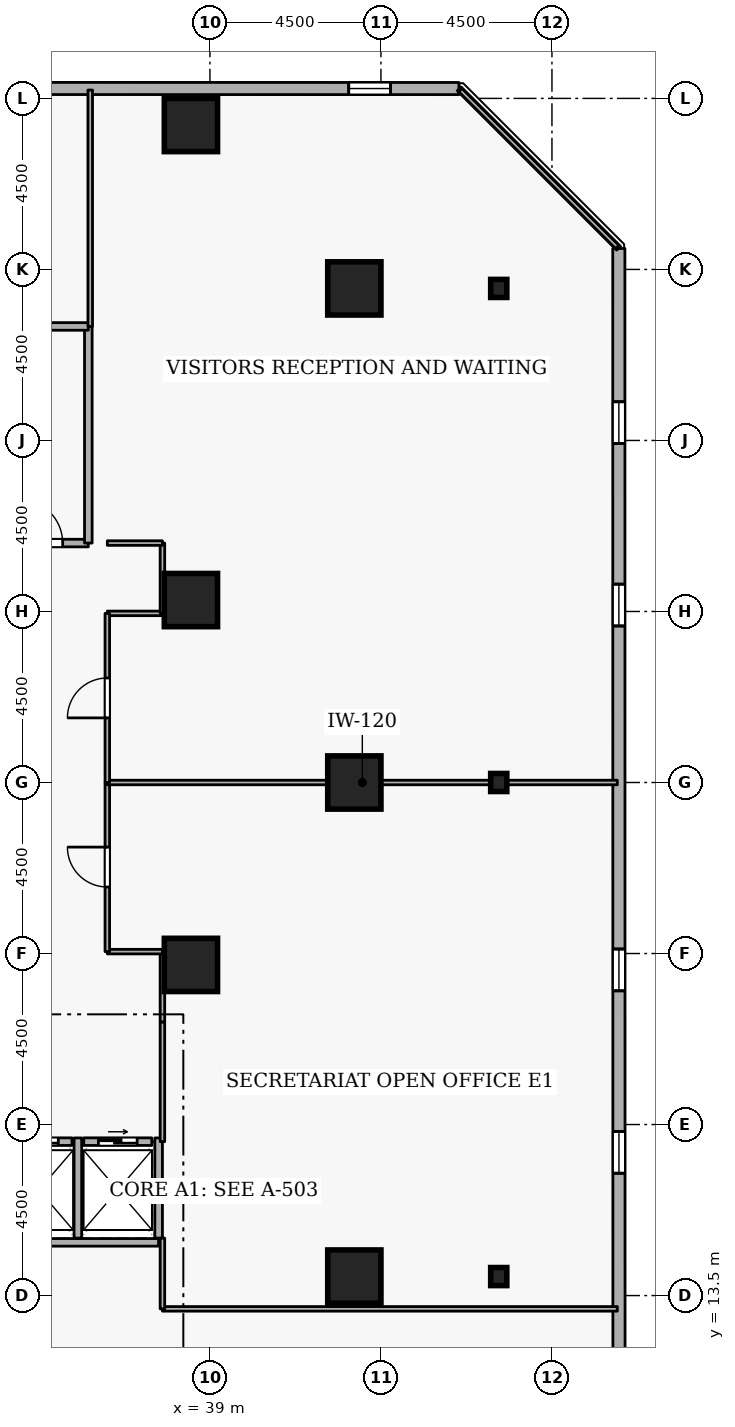
"""IFC4 building model, lengths in metres.
Left out: names, types, materials, properties, quantities, classifications, styles, units other than length and angle.
Written with IfcOpenShell. Run it as: python <this file> out.ifc"""

import sys

from ifc_helpers import new_model, si_unit, direction, frame, frame_2d, origin, origin_2d, place, context, subcontext, project, spatial, rectangle, i_section, extrude, element, fill, save


model = new_model("IFC4")
c1 = context("Model", 3, precision=1e-05, world=origin(), true_north=direction((0.0, 1.0)))
c2 = subcontext(c1, "Body", "Model", "MODEL_VIEW")
j1 = project(units=[si_unit("LENGTHUNIT", "METRE"), si_unit("PLANEANGLEUNIT", "RADIAN")], contexts=[c1])
p1 = place(None, origin())
s1 = spatial("IfcSite", under=j1, at=p1, CompositionType="ELEMENT")
p2 = place(p1, origin())
s2 = spatial("IfcBuilding", under=s1, at=p2, CompositionType="ELEMENT")
p3 = place(p2, frame((0.0, 0.0, 49.5)))
s3 = spatial("IfcBuildingStorey", under=s2, at=p3, CompositionType="ELEMENT", Elevation=49.5)
for number, where, z_axis, x_axis in (
    (1, (42.8, 14.0, 0.0), (0.0, 0.0, 1.0), (1.0, 0.0, 0.0)),
    (2, (42.8, 27.0, 0.0), (0.0, 0.0, 1.0), (1.0, 0.0, 0.0)),
    (3, (42.8, 40.0, 0.0), (0.0, 0.0, 1.0), (1.0, 0.0, 0.0)),
    (4, (38.5, 44.3, 0.0), (0.0, 0.0, 1.0), (1.0, 0.0, 0.0)),
    (5, (38.5, 22.2, 0.0), (0.0, 0.0, 1.0), (1.0, 0.0, 0.0)),
    (6, (38.5, 31.8, 0.0), (0.0, 0.0, 1.0), (1.0, 0.0, 0.0)),
):
    element("IfcColumn", number, at=place(p3, frame(where, z_axis=z_axis, x_axis=x_axis)), inside=s3, PredefinedType="COLUMN", context=c2, shape_type="SweptSolid", body=[
        extrude(rectangle(XDim=1.4, YDim=1.4, at=origin_2d()), origin(), (0.0, 0.0, 1.0), 4.2),
    ])
for number, where, z_axis, x_axis in (
    (7, (46.6, 14.0, 0.0), (0.0, 0.0, 1.0), (1.0, 0.0, 0.0)),
    (8, (46.6, 27.0, 0.0), (0.0, 0.0, 1.0), (1.0, 0.0, 0.0)),
    (9, (46.6, 40.0, 0.0), (0.0, 0.0, 1.0), (1.0, 0.0, 0.0)),
):
    element("IfcColumn", number, at=place(p3, frame(where, z_axis=z_axis, x_axis=x_axis)), inside=s3, PredefinedType="COLUMN", context=c2, shape_type="SweptSolid", body=[
        extrude(i_section(OverallWidth=0.424, OverallDepth=0.475, WebThickness=0.048, FlangeThickness=0.077, FilletRadius=0.015, at=origin_2d()), origin(), (0.0, 0.0, 1.0), 4.2),
    ])
p4 = place(p3, frame((49.765, 5.319, 0.0), z_axis=(0.0, 0.0, 1.0), x_axis=(-0.000150313265, 0.999999988703, 0.0)))
e10 = element("IfcWall", 10, at=p4, inside=s3, PredefinedType="STANDARD", context=c2, shape_type="SweptSolid", body=[
    extrude(rectangle(XDim=35.733, YDim=0.32, at=frame_2d((17.866, 0.0))), origin(), (0.0, 0.0, 1.0), 3.3),
])
p5 = place(p4, frame((1.8, 0.0, 0.72)))
e11 = element("IfcOpeningElement", 11, at=p5, cuts=e10, PredefinedType="OPENING", context=c2, shape_type="SweptSolid", body=[
    extrude(rectangle(XDim=1.1, YDim=1.8, at=frame_2d((0.55, 0.9))), frame((0.0, 0.17, 0.0), z_axis=(0.0, -1.0, 0.0), x_axis=(1.0, 0.0, 0.0)), (0.0, 0.0, 1.0), 0.34),
])
p6 = place(p4, frame((11.4, 0.0, 0.72)))
e12 = element("IfcOpeningElement", 12, at=p6, cuts=e10, PredefinedType="OPENING", context=c2, shape_type="SweptSolid", body=[
    extrude(rectangle(XDim=1.1, YDim=1.8, at=frame_2d((0.55, 0.9))), frame((0.0, 0.17, 0.0), z_axis=(0.0, -1.0, 0.0), x_axis=(1.0, 0.0, 0.0)), (0.0, 0.0, 1.0), 0.34),
])
p7 = place(p4, frame((16.2, 0.0, 0.72)))
e13 = element("IfcOpeningElement", 13, at=p7, cuts=e10, PredefinedType="OPENING", context=c2, shape_type="SweptSolid", body=[
    extrude(rectangle(XDim=1.1, YDim=1.8, at=frame_2d((0.55, 0.9))), frame((0.0, 0.17, 0.0), z_axis=(0.0, -1.0, 0.0), x_axis=(1.0, 0.0, 0.0)), (0.0, 0.0, 1.0), 0.34),
])
p8 = place(p4, frame((25.8, 0.0, 0.72)))
e14 = element("IfcOpeningElement", 14, at=p8, cuts=e10, PredefinedType="OPENING", context=c2, shape_type="SweptSolid", body=[
    extrude(rectangle(XDim=1.1, YDim=1.8, at=frame_2d((0.55, 0.9))), frame((0.0, 0.17, 0.0), z_axis=(0.0, -1.0, 0.0), x_axis=(1.0, 0.0, 0.0)), (0.0, 0.0, 1.0), 0.34),
])
p9 = place(p4, frame((30.6, 0.0, 0.72)))
e15 = element("IfcOpeningElement", 15, at=p9, cuts=e10, PredefinedType="OPENING", context=c2, shape_type="SweptSolid", body=[
    extrude(rectangle(XDim=1.1, YDim=1.8, at=frame_2d((0.55, 0.9))), frame((0.0, 0.17, 0.0), z_axis=(0.0, -1.0, 0.0), x_axis=(1.0, 0.0, 0.0)), (0.0, 0.0, 1.0), 0.34),
])
p10 = place(p3, frame((45.552, 45.26, 0.0), z_axis=(0.0, 0.0, 1.0), x_axis=(-0.999999988703, 0.000150313265, 0.0)))
e16 = element("IfcWall", 16, at=p10, inside=s3, PredefinedType="STANDARD", context=c2, shape_type="SweptSolid", body=[
    extrude(rectangle(XDim=35.733, YDim=0.32, at=frame_2d((17.866, 0.0))), origin(), (0.0, 0.0, 1.0), 3.3),
])
p11 = place(p10, frame((1.8, 0.0, 0.72)))
e17 = element("IfcOpeningElement", 17, at=p11, cuts=e16, PredefinedType="OPENING", context=c2, shape_type="SweptSolid", body=[
    extrude(rectangle(XDim=1.1, YDim=1.8, at=frame_2d((0.55, 0.9))), frame((0.0, 0.17, 0.0), z_axis=(0.0, -1.0, 0.0), x_axis=(1.0, 0.0, 0.0)), (0.0, 0.0, 1.0), 0.34),
])
p12 = place(p10, frame((11.4, 0.0, 0.72)))
e18 = element("IfcOpeningElement", 18, at=p12, cuts=e16, PredefinedType="OPENING", context=c2, shape_type="SweptSolid", body=[
    extrude(rectangle(XDim=1.1, YDim=1.8, at=frame_2d((0.55, 0.9))), frame((0.0, 0.17, 0.0), z_axis=(0.0, -1.0, 0.0), x_axis=(1.0, 0.0, 0.0)), (0.0, 0.0, 1.0), 0.34),
])
p13 = place(p10, frame((16.2, 0.0, 0.72)))
e19 = element("IfcOpeningElement", 19, at=p13, cuts=e16, PredefinedType="OPENING", context=c2, shape_type="SweptSolid", body=[
    extrude(rectangle(XDim=1.1, YDim=1.8, at=frame_2d((0.55, 0.9))), frame((0.0, 0.17, 0.0), z_axis=(0.0, -1.0, 0.0), x_axis=(1.0, 0.0, 0.0)), (0.0, 0.0, 1.0), 0.34),
])
p14 = place(p10, frame((25.8, 0.0, 0.72)))
e20 = element("IfcOpeningElement", 20, at=p14, cuts=e16, PredefinedType="OPENING", context=c2, shape_type="SweptSolid", body=[
    extrude(rectangle(XDim=1.1, YDim=1.8, at=frame_2d((0.55, 0.9))), frame((0.0, 0.17, 0.0), z_axis=(0.0, -1.0, 0.0), x_axis=(1.0, 0.0, 0.0)), (0.0, 0.0, 1.0), 0.34),
])
p15 = place(p10, frame((30.6, 0.0, 0.72)))
e21 = element("IfcOpeningElement", 21, at=p15, cuts=e16, PredefinedType="OPENING", context=c2, shape_type="SweptSolid", body=[
    extrude(rectangle(XDim=1.1, YDim=1.8, at=frame_2d((0.55, 0.9))), frame((0.0, 0.17, 0.0), z_axis=(0.0, -1.0, 0.0), x_axis=(1.0, 0.0, 0.0)), (0.0, 0.0, 1.0), 0.34),
])
p16 = place(p3, frame((33.63, 17.55, 0.0), z_axis=(0.0, 0.0, 1.0), x_axis=(1.0, 0.0, 0.0)))
e22 = element("IfcWall", 22, at=p16, inside=s3, PredefinedType="STANDARD", context=c2, shape_type="SweptSolid", body=[
    extrude(rectangle(XDim=1.74, YDim=0.2, at=frame_2d((0.87, 0.0))), origin(), (0.0, 0.0, 1.0), 3.94),
])
p17 = place(p16, frame((0.36, 0.0, 0.0)))
e23 = element("IfcOpeningElement", 23, at=p17, cuts=e22, PredefinedType="OPENING", context=c2, shape_type="SweptSolid", body=[
    extrude(rectangle(XDim=1.02, YDim=2.06, at=frame_2d((0.51, 1.03))), frame((0.0, 0.11, 0.0), z_axis=(0.0, -1.0, 0.0), x_axis=(1.0, 0.0, 0.0)), (0.0, 0.0, 1.0), 0.22),
])
p18 = place(p3, frame((35.68, 17.55, 0.0), z_axis=(0.0, 0.0, 1.0), x_axis=(1.0, 0.0, 0.0)))
e24 = element("IfcWall", 24, at=p18, inside=s3, PredefinedType="STANDARD", context=c2, shape_type="SweptSolid", body=[
    extrude(rectangle(XDim=1.79, YDim=0.2, at=frame_2d((0.895, 0.0))), origin(), (0.0, 0.0, 1.0), 3.94),
])
p19 = place(p18, frame((0.385, 0.0, 0.0)))
e25 = element("IfcOpeningElement", 25, at=p19, cuts=e24, PredefinedType="OPENING", context=c2, shape_type="SweptSolid", body=[
    extrude(rectangle(XDim=1.02, YDim=2.06, at=frame_2d((0.51, 1.03))), frame((0.0, 0.11, 0.0), z_axis=(0.0, -1.0, 0.0), x_axis=(1.0, 0.0, 0.0)), (0.0, 0.0, 1.0), 0.22),
])
p20 = place(p3, frame((33.452, 14.9, 0.0), z_axis=(0.0, 0.0, 1.0), x_axis=(1.0, 0.0, 0.0)))
e26 = element("IfcWall", 26, at=p20, inside=s3, PredefinedType="STANDARD", context=c2, shape_type="SweptSolid", body=[
    extrude(rectangle(XDim=4.196, YDim=0.2, at=frame_2d((2.098, 0.0))), origin(), (0.0, 0.0, 1.0), 3.94),
])
for number, where, z_axis, x_axis in (
    (27, (35.525, 15.012, 0.0), (0.0, 0.0, 1.0), (0.0, 1.0, 0.0)),
    (28, (37.65, 15.012, 0.0), (0.0, 0.0, 1.0), (0.0, 1.0, 0.0)),
):
    element("IfcWall", number, at=place(p3, frame(where, z_axis=z_axis, x_axis=x_axis)), inside=s3, PredefinedType="STANDARD", context=c2, shape_type="SweptSolid", body=[
        extrude(rectangle(XDim=2.636, YDim=0.2, at=frame_2d((1.318, 0.0))), origin(), (0.0, 0.0, 1.0), 3.94),
    ])
p21 = place(p3, frame((33.3, 33.3, 0.0), z_axis=(0.0, 0.0, 1.0), x_axis=(1.0, 0.0, 0.0)))
e29 = element("IfcWall", 29, at=p21, inside=s3, PredefinedType="STANDARD", context=c2, shape_type="SweptSolid", body=[
    extrude(rectangle(XDim=2.5, YDim=0.2, at=frame_2d((1.25, 0.0))), origin(), (0.0, 0.0, 1.0), 3.94),
])
p22 = place(p21, frame((0.675, 0.0, 0.0)))
e30 = element("IfcOpeningElement", 30, at=p22, cuts=e29, PredefinedType="OPENING", context=c2, shape_type="SweptSolid", body=[
    extrude(rectangle(XDim=1.15, YDim=2.1, at=frame_2d((0.575, 1.05))), frame((0.0, 0.11, 0.0), z_axis=(0.0, -1.0, 0.0), x_axis=(1.0, 0.0, 0.0)), (0.0, 0.0, 1.0), 0.22),
])
p23 = place(p3, frame((35.8, 33.3, 0.0), z_axis=(0.0, 0.0, 1.0), x_axis=(0.0, 1.0, 0.0)))
e31 = element("IfcWall", 31, at=p23, inside=s3, PredefinedType="STANDARD", context=c2, shape_type="SweptSolid", body=[
    extrude(rectangle(XDim=5.7, YDim=0.2, at=frame_2d((2.85, 0.0))), origin(), (0.0, 0.0, 1.0), 3.94),
])
p24 = place(p3, frame((35.8, 39.0, 0.0), z_axis=(0.0, 0.0, 1.0), x_axis=(-1.0, 0.0, 0.0)))
e32 = element("IfcWall", 32, at=p24, inside=s3, PredefinedType="STANDARD", context=c2, shape_type="SweptSolid", body=[
    extrude(rectangle(XDim=2.5, YDim=0.2, at=frame_2d((1.25, 0.0))), origin(), (0.0, 0.0, 1.0), 3.94),
])
p25 = place(p3, frame((37.75, 17.55, 0.0), z_axis=(0.0, 0.0, 1.0), x_axis=(0.0, 1.0, 0.0)))
e33 = element("IfcWall", 33, at=p25, inside=s3, PredefinedType="PARTITIONING", context=c2, shape_type="SweptSolid", body=[
    extrude(rectangle(XDim=3.15, YDim=0.12, at=frame_2d((1.575, 0.0))), origin(), (0.0, 0.0, 1.0), 3.94),
])
p26 = place(p3, frame((37.75, 20.7, 0.0), z_axis=(0.0, 0.0, 1.0), x_axis=(0.0, 1.0, 0.0)))
e34 = element("IfcWall", 34, at=p26, inside=s3, PredefinedType="PARTITIONING", context=c2, shape_type="SweptSolid", body=[
    extrude(rectangle(XDim=1.85, YDim=0.12, at=frame_2d((0.925, 0.0))), origin(), (0.0, 0.0, 1.0), 3.94),
])
p27 = place(p3, frame((37.75, 22.55, 0.0), z_axis=(0.0, 0.0, 1.0), x_axis=(-1.0, 0.0, 0.0)))
e35 = element("IfcWall", 35, at=p27, inside=s3, PredefinedType="PARTITIONING", context=c2, shape_type="SweptSolid", body=[
    extrude(rectangle(XDim=1.45, YDim=0.12, at=frame_2d((0.725, 0.0))), origin(), (0.0, 0.0, 1.0), 3.94),
])
p28 = place(p3, frame((36.3, 22.55, 0.0), z_axis=(0.0, 0.0, 1.0), x_axis=(0.0, 1.0, 0.0)))
e36 = element("IfcWall", 36, at=p28, inside=s3, PredefinedType="PARTITIONING", context=c2, shape_type="SweptSolid", body=[
    extrude(rectangle(XDim=4.45, YDim=0.12, at=frame_2d((2.225, 0.0))), origin(), (0.0, 0.0, 1.0), 3.94),
])
p29 = place(p28, frame((1.7, 0.0, 0.0)))
e37 = element("IfcOpeningElement", 37, at=p29, cuts=e36, PredefinedType="OPENING", context=c2, shape_type="SweptSolid", body=[
    extrude(rectangle(XDim=1.05, YDim=2.1, at=frame_2d((0.525, 1.05))), frame((0.0, 0.07, 0.0), z_axis=(0.0, -1.0, 0.0), x_axis=(1.0, 0.0, 0.0)), (0.0, 0.0, 1.0), 0.14),
])
p30 = place(p3, frame((36.3, 27.0, 0.0), z_axis=(0.0, 0.0, 1.0), x_axis=(1.0, 0.0, 0.0)))
e38 = element("IfcWall", 38, at=p30, inside=s3, PredefinedType="PARTITIONING", context=c2, shape_type="SweptSolid", body=[
    extrude(rectangle(XDim=13.42, YDim=0.12, at=frame_2d((6.71, 0.0))), origin(), (0.0, 0.0, 1.0), 3.532),
])
p31 = place(p3, frame((49.72, 13.15, 0.0), z_axis=(0.0, 0.0, 1.0), x_axis=(-1.0, 0.0, 0.0)))
e39 = element("IfcWall", 39, at=p31, inside=s3, PredefinedType="PARTITIONING", context=c2, shape_type="SweptSolid", body=[
    extrude(rectangle(XDim=11.97, YDim=0.12, at=frame_2d((5.985, 0.0))), origin(), (0.0, 0.0, 1.0), 3.94),
])
p32 = place(p3, frame((37.75, 13.15, 0.0), z_axis=(0.0, 0.0, 1.0), x_axis=(0.0, 1.0, 0.0)))
e40 = element("IfcWall", 40, at=p32, inside=s3, PredefinedType="PARTITIONING", context=c2, shape_type="SweptSolid", body=[
    extrude(rectangle(XDim=1.862, YDim=0.12, at=frame_2d((0.931, 0.0))), origin(), (0.0, 0.0, 1.0), 3.94),
])
p33 = place(p3, frame((36.3, 31.45, 0.0), z_axis=(0.0, 0.0, 1.0), x_axis=(1.0, 0.0, 0.0)))
e41 = element("IfcWall", 41, at=p33, inside=s3, PredefinedType="PARTITIONING", context=c2, shape_type="SweptSolid", body=[
    extrude(rectangle(XDim=1.45, YDim=0.12, at=frame_2d((0.725, 0.0))), origin(), (0.0, 0.0, 1.0), 3.94),
])
p34 = place(p3, frame((37.75, 31.45, 0.0), z_axis=(0.0, 0.0, 1.0), x_axis=(0.0, 1.0, 0.0)))
e42 = element("IfcWall", 42, at=p34, inside=s3, PredefinedType="PARTITIONING", context=c2, shape_type="SweptSolid", body=[
    extrude(rectangle(XDim=1.85, YDim=0.12, at=frame_2d((0.925, 0.0))), origin(), (0.0, 0.0, 1.0), 3.94),
])
p35 = place(p3, frame((37.75, 33.3, 0.0), z_axis=(0.0, 0.0, 1.0), x_axis=(-1.0, 0.0, 0.0)))
e43 = element("IfcWall", 43, at=p35, inside=s3, PredefinedType="PARTITIONING", context=c2, shape_type="SweptSolid", body=[
    extrude(rectangle(XDim=1.45, YDim=0.12, at=frame_2d((0.725, 0.0))), origin(), (0.0, 0.0, 1.0), 3.94),
])
p36 = place(p3, frame((35.85, 39.0, 0.0), z_axis=(0.0, 0.0, 1.0), x_axis=(0.0, 1.0, 0.0)))
e44 = element("IfcWall", 44, at=p36, inside=s3, PredefinedType="PARTITIONING", context=c2, shape_type="SweptSolid", body=[
    extrude(rectangle(XDim=6.22, YDim=0.12, at=frame_2d((3.11, 0.0))), origin(), (0.0, 0.0, 1.0), 3.94),
])
p37 = place(p3, frame((45.589, 45.22, 0.0), z_axis=(0.0, 0.0, 1.0), x_axis=(0.707106781187, -0.707106781187, 0.0)))
e45 = element("IfcWall", 45, at=p37, inside=s3, PredefinedType="PARTITIONING", context=c2, shape_type="SweptSolid", body=[
    extrude(rectangle(XDim=5.842, YDim=0.12, at=frame_2d((2.921, 0.0))), origin(), (0.0, 0.0, 1.0), 3.94),
])
p38 = place(p3, frame((36.3, 27.0, 0.0), z_axis=(0.0, 0.0, 1.0), x_axis=(0.0, 1.0, 0.0)))
e46 = element("IfcWall", 46, at=p38, inside=s3, PredefinedType="PARTITIONING", context=c2, shape_type="SweptSolid", body=[
    extrude(rectangle(XDim=4.45, YDim=0.12, at=frame_2d((2.225, 0.0))), origin(), (0.0, 0.0, 1.0), 3.94),
])
p39 = place(p38, frame((1.7, 0.0, 0.0)))
e47 = element("IfcOpeningElement", 47, at=p39, cuts=e46, PredefinedType="OPENING", context=c2, shape_type="SweptSolid", body=[
    extrude(rectangle(XDim=1.05, YDim=2.1, at=frame_2d((0.525, 1.05))), frame((0.0, 0.07, 0.0), z_axis=(0.0, -1.0, 0.0), x_axis=(1.0, 0.0, 0.0)), (0.0, 0.0, 1.0), 0.14),
])
p40 = place(p6, origin())
e48 = element("IfcWindow", 48, at=p40, inside=s3, PartitioningType="SINGLE_PANEL", PredefinedType="WINDOW", context=c2, shape_type="SweptSolid", body=[
    extrude(rectangle(XDim=1.1, YDim=1.8, at=frame_2d((0.55, 0.9))), frame((0.0, 0.03, 0.0), z_axis=(0.0, -1.0, 0.0), x_axis=(1.0, 0.0, 0.0)), (0.0, 0.0, 1.0), 0.06),
])
fill(e12, e48)
p41 = place(p7, origin())
e49 = element("IfcWindow", 49, at=p41, inside=s3, PartitioningType="SINGLE_PANEL", PredefinedType="WINDOW", context=c2, shape_type="SweptSolid", body=[
    extrude(rectangle(XDim=1.1, YDim=1.8, at=frame_2d((0.55, 0.9))), frame((0.0, 0.03, 0.0), z_axis=(0.0, -1.0, 0.0), x_axis=(1.0, 0.0, 0.0)), (0.0, 0.0, 1.0), 0.06),
])
fill(e13, e49)
p42 = place(p8, origin())
e50 = element("IfcWindow", 50, at=p42, inside=s3, PartitioningType="SINGLE_PANEL", PredefinedType="WINDOW", context=c2, shape_type="SweptSolid", body=[
    extrude(rectangle(XDim=1.1, YDim=1.8, at=frame_2d((0.55, 0.9))), frame((0.0, 0.03, 0.0), z_axis=(0.0, -1.0, 0.0), x_axis=(1.0, 0.0, 0.0)), (0.0, 0.0, 1.0), 0.06),
])
fill(e14, e50)
p43 = place(p9, origin())
e51 = element("IfcWindow", 51, at=p43, inside=s3, PartitioningType="SINGLE_PANEL", PredefinedType="WINDOW", context=c2, shape_type="SweptSolid", body=[
    extrude(rectangle(XDim=1.1, YDim=1.8, at=frame_2d((0.55, 0.9))), frame((0.0, 0.03, 0.0), z_axis=(0.0, -1.0, 0.0), x_axis=(1.0, 0.0, 0.0)), (0.0, 0.0, 1.0), 0.06),
])
fill(e15, e51)
p44 = place(p11, origin())
e52 = element("IfcWindow", 52, at=p44, inside=s3, PartitioningType="SINGLE_PANEL", PredefinedType="WINDOW", context=c2, shape_type="SweptSolid", body=[
    extrude(rectangle(XDim=1.1, YDim=1.8, at=frame_2d((0.55, 0.9))), frame((0.0, 0.03, 0.0), z_axis=(0.0, -1.0, 0.0), x_axis=(1.0, 0.0, 0.0)), (0.0, 0.0, 1.0), 0.06),
])
fill(e17, e52)
p45 = place(p17, origin())
e53 = element("IfcDoor", 53, at=p45, inside=s3, OperationType="SLIDING_TO_LEFT", PredefinedType="DOOR", context=c2, shape_type="SweptSolid", body=[
    extrude(rectangle(XDim=1.02, YDim=2.06, at=frame_2d((0.51, 1.03))), frame((0.0, 0.025, 0.0), z_axis=(0.0, -1.0, 0.0), x_axis=(1.0, 0.0, 0.0)), (0.0, 0.0, 1.0), 0.05),
])
fill(e23, e53)
p46 = place(p19, origin())
e54 = element("IfcDoor", 54, at=p46, inside=s3, OperationType="SLIDING_TO_LEFT", PredefinedType="DOOR", context=c2, shape_type="SweptSolid", body=[
    extrude(rectangle(XDim=1.02, YDim=2.06, at=frame_2d((0.51, 1.03))), frame((0.0, 0.025, 0.0), z_axis=(0.0, -1.0, 0.0), x_axis=(1.0, 0.0, 0.0)), (0.0, 0.0, 1.0), 0.05),
])
fill(e25, e54)
p47 = place(p22, origin())
e55 = element("IfcDoor", 55, at=p47, inside=s3, OperationType="SINGLE_SWING_LEFT", PredefinedType="DOOR", context=c2, shape_type="SweptSolid", body=[
    extrude(rectangle(XDim=1.15, YDim=2.1, at=frame_2d((0.575, 1.05))), frame((0.0, 0.025, 0.0), z_axis=(0.0, -1.0, 0.0), x_axis=(1.0, 0.0, 0.0)), (0.0, 0.0, 1.0), 0.05),
])
fill(e30, e55)
p48 = place(p29, origin())
e56 = element("IfcDoor", 56, at=p48, inside=s3, OperationType="SINGLE_SWING_RIGHT", PredefinedType="DOOR", context=c2, shape_type="SweptSolid", body=[
    extrude(rectangle(XDim=1.05, YDim=2.1, at=frame_2d((0.525, 1.05))), frame((0.0, 0.025, 0.0), z_axis=(0.0, -1.0, 0.0), x_axis=(1.0, 0.0, 0.0)), (0.0, 0.0, 1.0), 0.05),
])
fill(e37, e56)
p49 = place(p39, origin())
e57 = element("IfcDoor", 57, at=p49, inside=s3, OperationType="SINGLE_SWING_LEFT", PredefinedType="DOOR", context=c2, shape_type="SweptSolid", body=[
    extrude(rectangle(XDim=1.05, YDim=2.1, at=frame_2d((0.525, 1.05))), frame((0.0, 0.025, 0.0), z_axis=(0.0, -1.0, 0.0), x_axis=(1.0, 0.0, 0.0)), (0.0, 0.0, 1.0), 0.05),
])
fill(e47, e57)
save(model, sys.argv[1])
